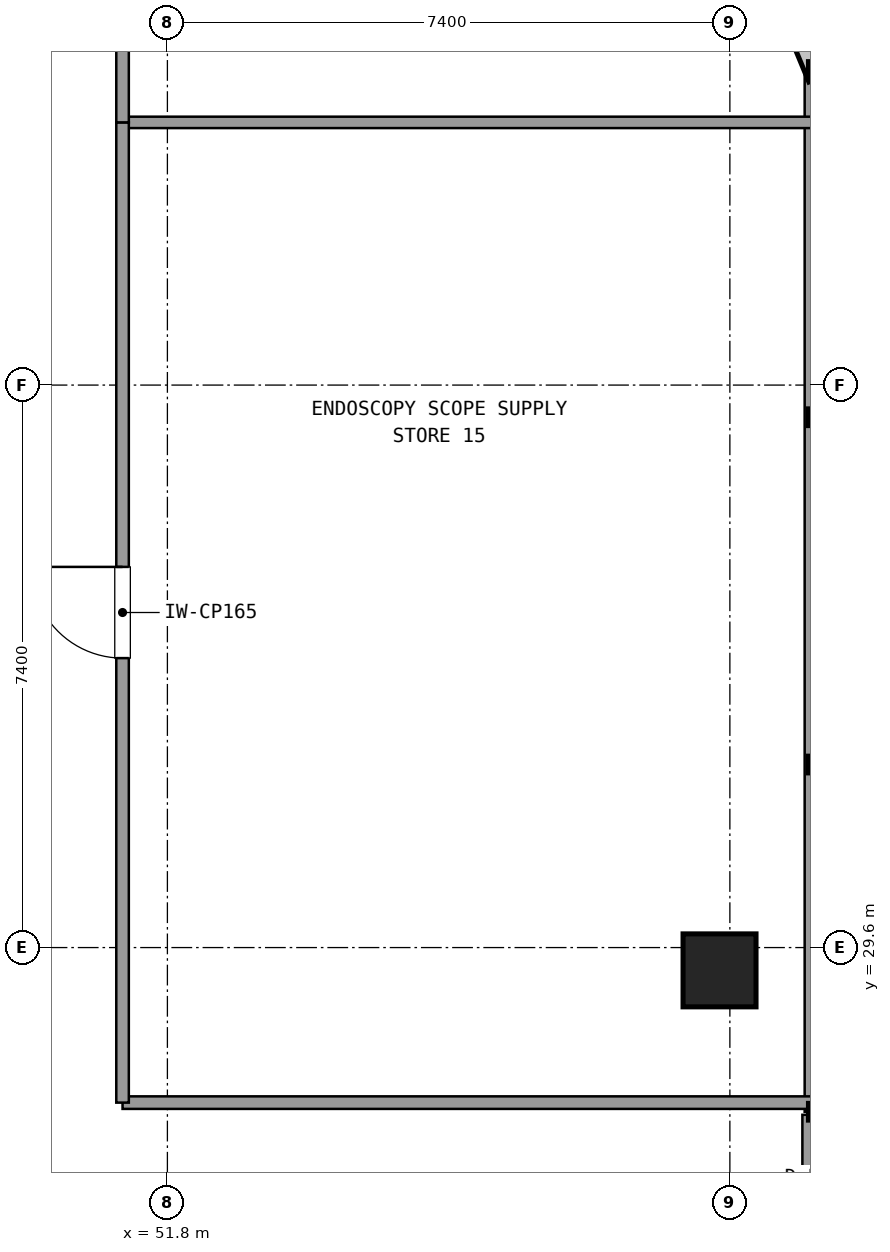
"""IFC4 building model, lengths in metres.
Left out: names, types, materials, properties, quantities, classifications, styles, units other than length and angle.
Written with IfcOpenShell. Run it as: python <this file> out.ifc"""

import sys

from ifc_helpers import new_model, si_unit, direction, frame, frame_2d, origin, origin_2d, place, context, subcontext, project, spatial, rectangle, extrude, element, fill, save


model = new_model("IFC4")
c1 = context("Model", 3, precision=1e-05, world=origin(), true_north=direction((0.0, 1.0)))
c2 = subcontext(c1, "Body", "Model", "MODEL_VIEW")
j1 = project(units=[si_unit("LENGTHUNIT", "METRE"), si_unit("PLANEANGLEUNIT", "RADIAN")], contexts=[c1])
p1 = place(None, origin())
s1 = spatial("IfcSite", under=j1, at=p1, CompositionType="ELEMENT")
p2 = place(p1, origin())
s2 = spatial("IfcBuilding", under=s1, at=p2, CompositionType="ELEMENT")
p3 = place(p2, frame((0.0, 0.0, 174.42)))
s3 = spatial("IfcBuildingStorey", under=s2, at=p3, CompositionType="ELEMENT", Elevation=174.42)
p4 = place(p3, frame((59.064, 29.3, 0.0), z_axis=(0.0, 0.0, 1.0), x_axis=(1.0, 0.0, 0.0)))
e1 = element("IfcColumn", 1, at=p4, inside=s3, PredefinedType="COLUMN", context=c2, shape_type="SweptSolid", body=[
    extrude(rectangle(XDim=0.96, YDim=0.96, at=origin_2d()), origin(), (0.0, 0.0, 1.0), 3.579),
])
p5 = place(p3, frame((60.304, 24.4, 0.0), z_axis=(0.0, 0.0, 1.0), x_axis=(0.0, 1.0, 0.0)))
e2 = element("IfcWall", 2, at=p5, inside=s3, PredefinedType="SOLIDWALL", context=c2, shape_type="SweptSolid", body=[
    extrude(rectangle(XDim=3.0, YDim=0.3, at=frame_2d((1.5, 0.0))), origin(), (0.0, 0.0, 1.0), 2.65),
])
p6 = place(p5, frame((0.9, 0.0, 0.0)))
e3 = element("IfcOpeningElement", 3, at=p6, cuts=e2, PredefinedType="OPENING", context=c2, shape_type="SweptSolid", body=[
    extrude(rectangle(XDim=1.2, YDim=2.2, at=frame_2d((0.6, 1.1))), frame((0.0, 0.16, 0.0), z_axis=(0.0, -1.0, 0.0), x_axis=(1.0, 0.0, 0.0)), (0.0, 0.0, 1.0), 0.32),
])
p7 = place(p3, frame((60.304, 27.44, 0.0), z_axis=(0.0, 0.0, 1.0), x_axis=(0.0, 1.0, 0.0)))
e4 = element("IfcWall", 4, at=p7, inside=s3, PredefinedType="SOLIDWALL", context=c2, shape_type="SweptSolid", body=[
    extrude(rectangle(XDim=13.705, YDim=0.24, at=frame_2d((6.853, 0.0))), origin(), (0.0, 0.0, 1.0), 0.85),
])
p8 = place(p3, frame((51.21, 27.56, 0.0), z_axis=(0.0, 0.0, 1.0), x_axis=(1.0, 0.0, 0.0)))
e5 = element("IfcWall", 5, at=p8, inside=s3, PredefinedType="PARTITIONING", context=c2, shape_type="SweptSolid", body=[
    extrude(rectangle(XDim=9.074, YDim=0.165, at=frame_2d((4.537, 0.0))), origin(), (0.0, 0.0, 1.0), 2.59),
])
p9 = place(p3, frame((51.21, 40.456, 0.0), z_axis=(0.0, 0.0, 1.0), x_axis=(1.0, 0.0, 0.0)))
e6 = element("IfcWall", 6, at=p9, inside=s3, PredefinedType="PARTITIONING", context=c2, shape_type="SweptSolid", body=[
    extrude(rectangle(XDim=9.074, YDim=0.15, at=frame_2d((4.537, 0.0))), origin(), (0.0, 0.0, 1.0), 2.59),
])
p10 = place(p3, frame((51.21, 27.56, 0.0), z_axis=(0.0, 0.0, 1.0), x_axis=(0.0, 1.0, 0.0)))
e7 = element("IfcWall", 7, at=p10, inside=s3, PredefinedType="PARTITIONING", context=c2, shape_type="SweptSolid", body=[
    extrude(rectangle(XDim=12.896, YDim=0.165, at=frame_2d((6.448, 0.0))), origin(), (0.0, 0.0, 1.0), 2.59),
])
p11 = place(p10, frame((5.848, 0.0, 0.0)))
e8 = element("IfcOpeningElement", 8, at=p11, cuts=e7, PredefinedType="OPENING", context=c2, shape_type="SweptSolid", body=[
    extrude(rectangle(XDim=1.2, YDim=2.15, at=frame_2d((0.6, 1.075))), frame((0.0, 0.093, 0.0), z_axis=(0.0, -1.0, 0.0), x_axis=(1.0, 0.0, 0.0)), (0.0, 0.0, 1.0), 0.185),
])
p12 = place(p3, frame((51.21, 40.456, 0.0), z_axis=(0.0, 0.0, 1.0), x_axis=(0.0, 1.0, 0.0)))
e9 = element("IfcWall", 9, at=p12, inside=s3, PredefinedType="PARTITIONING", context=c2, shape_type="SweptSolid", body=[
    extrude(rectangle(XDim=6.644, YDim=0.165, at=frame_2d((3.322, 0.0))), origin(), (0.0, 0.0, 1.0), 2.59),
])
p13 = place(p12, frame((2.722, 0.0, 0.0)))
e10 = element("IfcOpeningElement", 10, at=p13, cuts=e9, PredefinedType="OPENING", context=c2, shape_type="SweptSolid", body=[
    extrude(rectangle(XDim=1.2, YDim=2.15, at=frame_2d((0.6, 1.075))), frame((0.0, 0.093, 0.0), z_axis=(0.0, -1.0, 0.0), x_axis=(1.0, 0.0, 0.0)), (0.0, 0.0, 1.0), 0.185),
])
p14 = place(p11, origin())
e11 = element("IfcDoor", 11, at=p14, inside=s3, OperationType="SINGLE_SWING_RIGHT", PredefinedType="DOOR", context=c2, shape_type="SweptSolid", body=[
    extrude(rectangle(XDim=1.2, YDim=2.15, at=frame_2d((0.6, 1.075))), frame((0.0, 0.025, 0.0), z_axis=(0.0, -1.0, 0.0), x_axis=(1.0, 0.0, 0.0)), (0.0, 0.0, 1.0), 0.05),
])
fill(e8, e11)
save(model, sys.argv[1])
